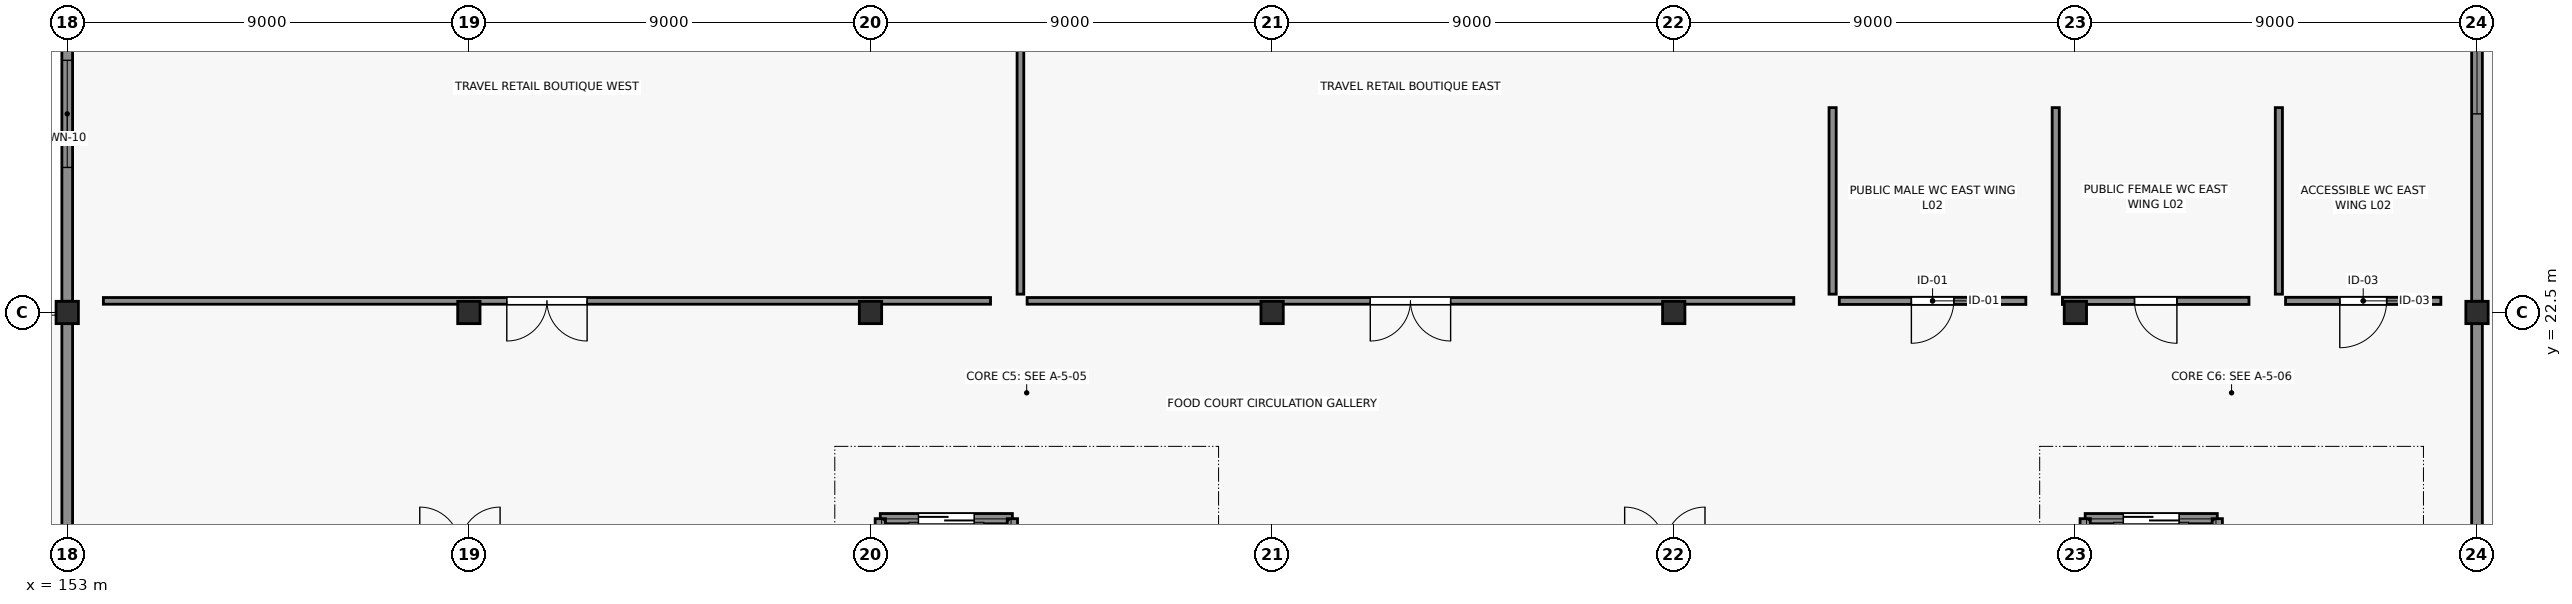
"""IFC4 building model, lengths in metres.
Left out: names, types, materials, properties, quantities, classifications, styles, units other than length and angle.
Written with IfcOpenShell. Run it as: python <this file> out.ifc"""

import sys

from ifc_helpers import new_model, si_unit, direction, frame, frame_2d, origin, origin_2d, place, context, subcontext, project, spatial, rectangle, extrude, element, fill, save


model = new_model("IFC4")
c1 = context("Model", 3, precision=1e-05, world=origin(), true_north=direction((0.0, 1.0)))
c2 = subcontext(c1, "Body", "Model", "MODEL_VIEW")
j1 = project(units=[si_unit("LENGTHUNIT", "METRE"), si_unit("PLANEANGLEUNIT", "RADIAN")], contexts=[c1])
p1 = place(None, origin())
s1 = spatial("IfcSite", under=j1, at=p1, CompositionType="ELEMENT")
p2 = place(p1, origin())
s2 = spatial("IfcBuilding", under=s1, at=p2, CompositionType="ELEMENT")
p3 = place(p2, frame((0.0, 0.0, 9.8)))
s3 = spatial("IfcBuildingStorey", under=s2, at=p3, CompositionType="ELEMENT", Elevation=9.8)
for number, where, z_axis, x_axis in (
    (1, (153.0, 22.5, 0.0), (0.0, 0.0, 1.0), (1.0, 0.0, 0.0)),
    (2, (162.0, 22.5, 0.0), (0.0, 0.0, 1.0), (1.0, 0.0, 0.0)),
    (3, (171.0, 22.5, 0.0), (0.0, 0.0, 1.0), (1.0, 0.0, 0.0)),
    (4, (180.0, 22.5, 0.0), (0.0, 0.0, 1.0), (1.0, 0.0, 0.0)),
    (5, (189.0, 22.5, 0.0), (0.0, 0.0, 1.0), (1.0, 0.0, 0.0)),
    (6, (198.0, 22.5, 0.0), (0.0, 0.0, 1.0), (1.0, 0.0, 0.0)),
    (7, (207.0, 22.5, 0.0), (0.0, 0.0, 1.0), (1.0, 0.0, 0.0)),
):
    element("IfcColumn", number, at=place(p3, frame(where, z_axis=z_axis, x_axis=x_axis)), inside=s3, PredefinedType="COLUMN", context=c2, shape_type="SweptSolid", body=[
        extrude(rectangle(XDim=0.5, YDim=0.5, at=origin_2d()), origin(), (0.0, 0.0, 1.0), 4.87),
    ])
for number, where, z_axis, x_axis in (
    (8, (153.0, 11.25, 0.0), (0.0, 0.0, 1.0), (0.0, 1.0, 0.0)),
    (9, (207.0, 22.25, 0.0), (0.0, 0.0, 1.0), (0.0, -1.0, 0.0)),
):
    element("IfcWall", number, at=place(p3, frame(where, z_axis=z_axis, x_axis=x_axis)), inside=s3, PredefinedType="SOLIDWALL", context=c2, shape_type="SweptSolid", body=[
        extrude(rectangle(XDim=11.0, YDim=0.24, at=frame_2d((5.5, 0.0))), origin(), (0.0, 0.0, 1.0), 4.39),
    ])
p4 = place(p3, frame((153.0, 22.75, 0.0), z_axis=(0.0, 0.0, 1.0), x_axis=(0.0, 1.0, 0.0)))
e10 = element("IfcWall", 10, at=p4, inside=s3, PredefinedType="SOLIDWALL", context=c2, shape_type="SweptSolid", body=[
    extrude(rectangle(XDim=10.0, YDim=0.24, at=frame_2d((5.0, 0.0))), origin(), (0.0, 0.0, 1.0), 4.39),
])
p5 = place(p4, frame((3.0, 0.0, 1.0)))
e11 = element("IfcOpeningElement", 11, at=p5, cuts=e10, PredefinedType="OPENING", context=c2, shape_type="SweptSolid", body=[
    extrude(rectangle(XDim=2.4, YDim=2.1, at=frame_2d((1.2, 1.05))), frame((0.0, 0.13, 0.0), z_axis=(0.0, -1.0, 0.0), x_axis=(1.0, 0.0, 0.0)), (0.0, 0.0, 1.0), 0.26),
])
p6 = place(p3, frame((207.0, 32.75, 0.0), z_axis=(0.0, 0.0, 1.0), x_axis=(0.0, -1.0, 0.0)))
e12 = element("IfcWall", 12, at=p6, inside=s3, PredefinedType="SOLIDWALL", context=c2, shape_type="SweptSolid", body=[
    extrude(rectangle(XDim=10.0, YDim=0.24, at=frame_2d((5.0, 0.0))), origin(), (0.0, 0.0, 1.0), 4.39),
])
p7 = place(p6, frame((2.6, 0.0, 1.05)))
e13 = element("IfcOpeningElement", 13, at=p7, cuts=e12, PredefinedType="OPENING", context=c2, shape_type="SweptSolid", body=[
    extrude(rectangle(XDim=3.2, YDim=1.8, at=frame_2d((1.6, 0.9))), frame((0.0, 0.13, 0.0), z_axis=(0.0, -1.0, 0.0), x_axis=(1.0, 0.0, 0.0)), (0.0, 0.0, 1.0), 0.26),
])
p8 = place(p3, frame((173.69, 22.76, 0.0), z_axis=(0.0, 0.0, 1.0), x_axis=(-1.0, 0.0, 0.0)))
e14 = element("IfcWall", 14, at=p8, inside=s3, PredefinedType="PARTITIONING", context=c2, shape_type="SweptSolid", body=[
    extrude(rectangle(XDim=19.88, YDim=0.15, at=frame_2d((9.94, 0.0))), origin(), (0.0, 0.0, 1.0), 4.44),
])
p9 = place(p8, frame((9.04, 0.0, 0.0)))
e15 = element("IfcOpeningElement", 15, at=p9, cuts=e14, PredefinedType="OPENING", context=c2, shape_type="SweptSolid", body=[
    extrude(rectangle(XDim=1.8, YDim=2.3, at=frame_2d((0.9, 1.15))), frame((0.0, 0.085, 0.0), z_axis=(0.0, -1.0, 0.0), x_axis=(1.0, 0.0, 0.0)), (0.0, 0.0, 1.0), 0.17),
])
p10 = place(p3, frame((191.69, 22.76, 0.0), z_axis=(0.0, 0.0, 1.0), x_axis=(-1.0, 0.0, 0.0)))
e16 = element("IfcWall", 16, at=p10, inside=s3, PredefinedType="PARTITIONING", context=c2, shape_type="SweptSolid", body=[
    extrude(rectangle(XDim=17.18, YDim=0.15, at=frame_2d((8.59, 0.0))), origin(), (0.0, 0.0, 1.0), 4.44),
])
p11 = place(p10, frame((7.69, 0.0, 0.0)))
e17 = element("IfcOpeningElement", 17, at=p11, cuts=e16, PredefinedType="OPENING", context=c2, shape_type="SweptSolid", body=[
    extrude(rectangle(XDim=1.8, YDim=2.3, at=frame_2d((0.9, 1.15))), frame((0.0, 0.085, 0.0), z_axis=(0.0, -1.0, 0.0), x_axis=(1.0, 0.0, 0.0)), (0.0, 0.0, 1.0), 0.17),
])
p12 = place(p3, frame((174.36, 22.91, 0.0), z_axis=(0.0, 0.0, 1.0), x_axis=(0.0, 1.0, 0.0)))
e18 = element("IfcWall", 18, at=p12, inside=s3, PredefinedType="PARTITIONING", context=c2, shape_type="SweptSolid", body=[
    extrude(rectangle(XDim=9.18, YDim=0.15, at=frame_2d((4.59, 0.0))), origin(), (0.0, 0.0, 1.0), 4.8),
])
p13 = place(p3, frame((196.89, 22.76, 0.0), z_axis=(0.0, 0.0, 1.0), x_axis=(-1.0, 0.0, 0.0)))
e19 = element("IfcWall", 19, at=p13, inside=s3, PredefinedType="PARTITIONING", context=c2, shape_type="SweptSolid", body=[
    extrude(rectangle(XDim=4.18, YDim=0.16, at=frame_2d((2.09, 0.0))), origin(), (0.0, 0.0, 1.0), 4.44),
])
p14 = place(p13, frame((1.615, 0.0, 0.0)))
e20 = element("IfcOpeningElement", 20, at=p14, cuts=e19, PredefinedType="OPENING", context=c2, shape_type="SweptSolid", body=[
    extrude(rectangle(XDim=0.95, YDim=2.15, at=frame_2d((0.475, 1.075))), frame((0.0, 0.09, 0.0), z_axis=(0.0, -1.0, 0.0), x_axis=(1.0, 0.0, 0.0)), (0.0, 0.0, 1.0), 0.18),
])
p15 = place(p3, frame((192.56, 22.91, 0.0), z_axis=(0.0, 0.0, 1.0), x_axis=(0.0, 1.0, 0.0)))
e21 = element("IfcWall", 21, at=p15, inside=s3, PredefinedType="PARTITIONING", context=c2, shape_type="SweptSolid", body=[
    extrude(rectangle(XDim=4.18, YDim=0.16, at=frame_2d((2.09, 0.0))), origin(), (0.0, 0.0, 1.0), 4.8),
])
p16 = place(p3, frame((201.89, 22.76, 0.0), z_axis=(0.0, 0.0, 1.0), x_axis=(-1.0, 0.0, 0.0)))
e22 = element("IfcWall", 22, at=p16, inside=s3, PredefinedType="PARTITIONING", context=c2, shape_type="SweptSolid", body=[
    extrude(rectangle(XDim=4.18, YDim=0.16, at=frame_2d((2.09, 0.0))), origin(), (0.0, 0.0, 1.0), 4.44),
])
p17 = place(p16, frame((1.615, 0.0, 0.0)))
e23 = element("IfcOpeningElement", 23, at=p17, cuts=e22, PredefinedType="OPENING", context=c2, shape_type="SweptSolid", body=[
    extrude(rectangle(XDim=0.95, YDim=2.15, at=frame_2d((0.475, 1.075))), frame((0.0, 0.09, 0.0), z_axis=(0.0, -1.0, 0.0), x_axis=(1.0, 0.0, 0.0)), (0.0, 0.0, 1.0), 0.18),
])
p18 = place(p3, frame((197.56, 22.91, 0.0), z_axis=(0.0, 0.0, 1.0), x_axis=(0.0, 1.0, 0.0)))
e24 = element("IfcWall", 24, at=p18, inside=s3, PredefinedType="PARTITIONING", context=c2, shape_type="SweptSolid", body=[
    extrude(rectangle(XDim=4.18, YDim=0.16, at=frame_2d((2.09, 0.0))), origin(), (0.0, 0.0, 1.0), 4.8),
])
p19 = place(p3, frame((206.19, 22.76, 0.0), z_axis=(0.0, 0.0, 1.0), x_axis=(-1.0, 0.0, 0.0)))
e25 = element("IfcWall", 25, at=p19, inside=s3, PredefinedType="PARTITIONING", context=c2, shape_type="SweptSolid", body=[
    extrude(rectangle(XDim=3.48, YDim=0.16, at=frame_2d((1.74, 0.0))), origin(), (0.0, 0.0, 1.0), 4.44),
])
p20 = place(p19, frame((1.215, 0.0, 0.0)))
e26 = element("IfcOpeningElement", 26, at=p20, cuts=e25, PredefinedType="OPENING", context=c2, shape_type="SweptSolid", body=[
    extrude(rectangle(XDim=1.05, YDim=2.2, at=frame_2d((0.525, 1.1))), frame((0.0, 0.09, 0.0), z_axis=(0.0, -1.0, 0.0), x_axis=(1.0, 0.0, 0.0)), (0.0, 0.0, 1.0), 0.18),
])
p21 = place(p3, frame((202.56, 22.91, 0.0), z_axis=(0.0, 0.0, 1.0), x_axis=(0.0, 1.0, 0.0)))
e27 = element("IfcWall", 27, at=p21, inside=s3, PredefinedType="PARTITIONING", context=c2, shape_type="SweptSolid", body=[
    extrude(rectangle(XDim=4.18, YDim=0.16, at=frame_2d((2.09, 0.0))), origin(), (0.0, 0.0, 1.0), 4.8),
])
p22 = place(p3, frame((171.22, 17.88, 0.0), z_axis=(0.0, 0.0, 1.0), x_axis=(1.0, 0.0, 0.0)))
e28 = element("IfcWall", 28, at=p22, inside=s3, PredefinedType="SOLIDWALL", context=c2, shape_type="SweptSolid", body=[
    extrude(rectangle(XDim=2.96, YDim=0.23, at=frame_2d((1.48, 0.0))), origin(), (0.0, 0.0, 1.0), 4.44),
])
p23 = place(p22, frame((0.855, 0.0, 0.0)))
e29 = element("IfcOpeningElement", 29, at=p23, cuts=e28, PredefinedType="OPENING", context=c2, shape_type="SweptSolid", body=[
    extrude(rectangle(XDim=1.25, YDim=2.2, at=frame_2d((0.625, 1.1))), frame((0.0, 0.125, 0.0), z_axis=(0.0, -1.0, 0.0), x_axis=(1.0, 0.0, 0.0)), (0.0, 0.0, 1.0), 0.25),
])
p24 = place(p3, frame((171.22, 15.72, 0.0), z_axis=(0.0, 0.0, 1.0), x_axis=(0.0, 1.0, 0.0)))
e30 = element("IfcWall", 30, at=p24, inside=s3, PredefinedType="SOLIDWALL", context=c2, shape_type="SweptSolid", body=[
    extrude(rectangle(XDim=2.16, YDim=0.23, at=frame_2d((1.08, 0.0))), origin(), (0.0, 0.0, 1.0), 4.44),
])
p25 = place(p3, frame((174.18, 17.88, 0.0), z_axis=(0.0, 0.0, 1.0), x_axis=(0.0, -1.0, 0.0)))
e31 = element("IfcWall", 31, at=p25, inside=s3, PredefinedType="SOLIDWALL", context=c2, shape_type="SweptSolid", body=[
    extrude(rectangle(XDim=2.16, YDim=0.23, at=frame_2d((1.08, 0.0))), origin(), (0.0, 0.0, 1.0), 4.96),
])
p26 = place(p3, frame((198.22, 17.88, 0.0), z_axis=(0.0, 0.0, 1.0), x_axis=(1.0, 0.0, 0.0)))
e32 = element("IfcWall", 32, at=p26, inside=s3, PredefinedType="SOLIDWALL", context=c2, shape_type="SweptSolid", body=[
    extrude(rectangle(XDim=2.96, YDim=0.23, at=frame_2d((1.48, 0.0))), origin(), (0.0, 0.0, 1.0), 4.44),
])
p27 = place(p26, frame((0.855, 0.0, 0.0)))
e33 = element("IfcOpeningElement", 33, at=p27, cuts=e32, PredefinedType="OPENING", context=c2, shape_type="SweptSolid", body=[
    extrude(rectangle(XDim=1.25, YDim=2.2, at=frame_2d((0.625, 1.1))), frame((0.0, 0.125, 0.0), z_axis=(0.0, -1.0, 0.0), x_axis=(1.0, 0.0, 0.0)), (0.0, 0.0, 1.0), 0.25),
])
p28 = place(p3, frame((198.22, 15.72, 0.0), z_axis=(0.0, 0.0, 1.0), x_axis=(0.0, 1.0, 0.0)))
e34 = element("IfcWall", 34, at=p28, inside=s3, PredefinedType="SOLIDWALL", context=c2, shape_type="SweptSolid", body=[
    extrude(rectangle(XDim=2.16, YDim=0.23, at=frame_2d((1.08, 0.0))), origin(), (0.0, 0.0, 1.0), 4.44),
])
p29 = place(p3, frame((201.18, 17.88, 0.0), z_axis=(0.0, 0.0, 1.0), x_axis=(0.0, -1.0, 0.0)))
e35 = element("IfcWall", 35, at=p29, inside=s3, PredefinedType="SOLIDWALL", context=c2, shape_type="SweptSolid", body=[
    extrude(rectangle(XDim=2.16, YDim=0.23, at=frame_2d((1.08, 0.0))), origin(), (0.0, 0.0, 1.0), 4.96),
])
p30 = place(p5, origin())
e36 = element("IfcWindow", 36, at=p30, inside=s3, PartitioningType="SINGLE_PANEL", PredefinedType="WINDOW", context=c2, shape_type="SweptSolid", body=[
    extrude(rectangle(XDim=2.4, YDim=2.1, at=frame_2d((1.2, 1.05))), frame((0.0, 0.03, 0.0), z_axis=(0.0, -1.0, 0.0), x_axis=(1.0, 0.0, 0.0)), (0.0, 0.0, 1.0), 0.06),
])
fill(e11, e36)
p31 = place(p7, origin())
e37 = element("IfcWindow", 37, at=p31, inside=s3, PartitioningType="SINGLE_PANEL", PredefinedType="WINDOW", context=c2, shape_type="SweptSolid", body=[
    extrude(rectangle(XDim=3.2, YDim=1.8, at=frame_2d((1.6, 0.9))), frame((0.0, 0.03, 0.0), z_axis=(0.0, -1.0, 0.0), x_axis=(1.0, 0.0, 0.0)), (0.0, 0.0, 1.0), 0.06),
])
fill(e13, e37)
p32 = place(p9, origin())
e38 = element("IfcDoor", 38, at=p32, inside=s3, OperationType="DOUBLE_DOOR_SINGLE_SWING", PredefinedType="DOOR", context=c2, shape_type="SweptSolid", body=[
    extrude(rectangle(XDim=1.8, YDim=2.3, at=frame_2d((0.9, 1.15))), frame((0.0, 0.025, 0.0), z_axis=(0.0, -1.0, 0.0), x_axis=(1.0, 0.0, 0.0)), (0.0, 0.0, 1.0), 0.05),
])
fill(e15, e38)
p33 = place(p11, origin())
e39 = element("IfcDoor", 39, at=p33, inside=s3, OperationType="DOUBLE_DOOR_SINGLE_SWING", PredefinedType="DOOR", context=c2, shape_type="SweptSolid", body=[
    extrude(rectangle(XDim=1.8, YDim=2.3, at=frame_2d((0.9, 1.15))), frame((0.0, 0.025, 0.0), z_axis=(0.0, -1.0, 0.0), x_axis=(1.0, 0.0, 0.0)), (0.0, 0.0, 1.0), 0.05),
])
fill(e17, e39)
p34 = place(p14, origin())
e40 = element("IfcDoor", 40, at=p34, inside=s3, OperationType="SINGLE_SWING_RIGHT", PredefinedType="DOOR", context=c2, shape_type="SweptSolid", body=[
    extrude(rectangle(XDim=0.95, YDim=2.15, at=frame_2d((0.475, 1.075))), frame((0.0, 0.025, 0.0), z_axis=(0.0, -1.0, 0.0), x_axis=(1.0, 0.0, 0.0)), (0.0, 0.0, 1.0), 0.05),
])
fill(e20, e40)
p35 = place(p17, origin())
e41 = element("IfcDoor", 41, at=p35, inside=s3, OperationType="SINGLE_SWING_LEFT", PredefinedType="DOOR", context=c2, shape_type="SweptSolid", body=[
    extrude(rectangle(XDim=0.95, YDim=2.15, at=frame_2d((0.475, 1.075))), frame((0.0, 0.025, 0.0), z_axis=(0.0, -1.0, 0.0), x_axis=(1.0, 0.0, 0.0)), (0.0, 0.0, 1.0), 0.05),
])
fill(e23, e41)
p36 = place(p20, origin())
e42 = element("IfcDoor", 42, at=p36, inside=s3, OperationType="SINGLE_SWING_RIGHT", PredefinedType="DOOR", context=c2, shape_type="SweptSolid", body=[
    extrude(rectangle(XDim=1.05, YDim=2.2, at=frame_2d((0.525, 1.1))), frame((0.0, 0.025, 0.0), z_axis=(0.0, -1.0, 0.0), x_axis=(1.0, 0.0, 0.0)), (0.0, 0.0, 1.0), 0.05),
])
fill(e26, e42)
p37 = place(p23, origin())
e43 = element("IfcDoor", 43, at=p37, inside=s3, OperationType="DOUBLE_DOOR_SLIDING", PredefinedType="DOOR", context=c2, shape_type="SweptSolid", body=[
    extrude(rectangle(XDim=1.25, YDim=2.2, at=frame_2d((0.625, 1.1))), frame((0.0, 0.025, 0.0), z_axis=(0.0, -1.0, 0.0), x_axis=(1.0, 0.0, 0.0)), (0.0, 0.0, 1.0), 0.05),
])
fill(e29, e43)
p38 = place(p27, origin())
e44 = element("IfcDoor", 44, at=p38, inside=s3, OperationType="DOUBLE_DOOR_SLIDING", PredefinedType="DOOR", context=c2, shape_type="SweptSolid", body=[
    extrude(rectangle(XDim=1.25, YDim=2.2, at=frame_2d((0.625, 1.1))), frame((0.0, 0.025, 0.0), z_axis=(0.0, -1.0, 0.0), x_axis=(1.0, 0.0, 0.0)), (0.0, 0.0, 1.0), 0.05),
])
fill(e33, e44)
save(model, sys.argv[1])
